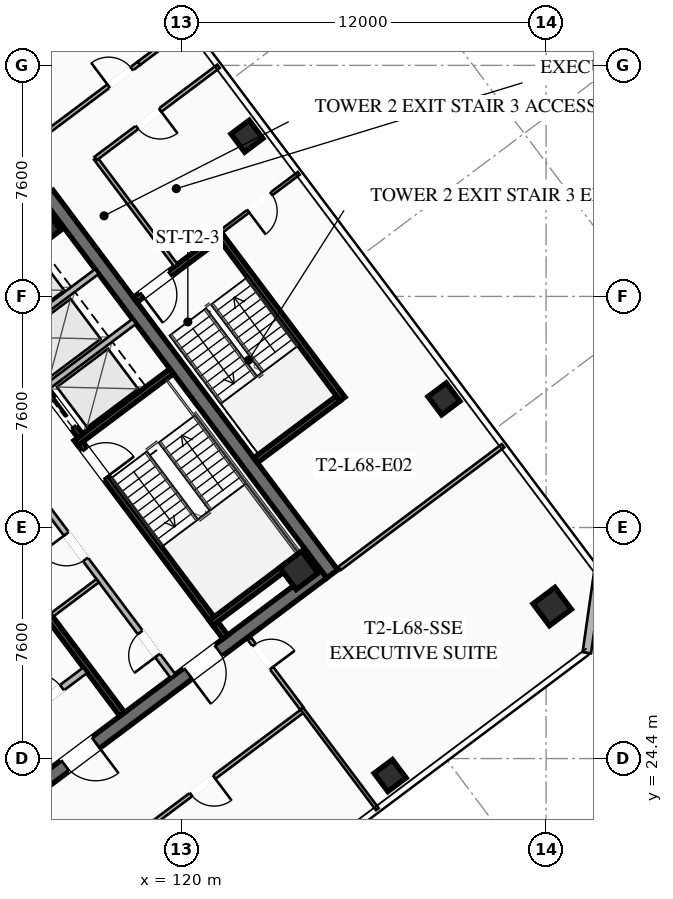
"""IFC4 building model, lengths in metres.
Left out: names, types, materials, properties, quantities, classifications, styles, units other than length and angle.
Written with IfcOpenShell. Run it as: python <this file> out.ifc"""

import sys

from ifc_helpers import new_model, si_unit, direction, frame, frame_2d, origin, origin_2d, place, context, subcontext, project, spatial, rectangle, hollow_rectangle, extrude, element, fill, save


model = new_model("IFC4")
c1 = context("Model", 3, precision=1e-05, world=origin(), true_north=direction((0.0, 1.0)))
c2 = subcontext(c1, "Body", "Model", "MODEL_VIEW")
j1 = project(units=[si_unit("LENGTHUNIT", "METRE"), si_unit("PLANEANGLEUNIT", "RADIAN")], contexts=[c1])
p1 = place(None, origin())
s1 = spatial("IfcSite", under=j1, at=p1, CompositionType="ELEMENT")
p2 = place(p1, origin())
s2 = spatial("IfcBuilding", under=s1, at=p2, CompositionType="ELEMENT")
p3 = place(p2, frame((0.0, 0.0, 251.4)))
s3 = spatial("IfcBuildingStorey", under=s2, at=p3, CompositionType="ELEMENT", Elevation=251.4)
p4 = place(p3, frame((115.604, 42.953, 0.0), z_axis=(0.0, 0.0, 1.0), x_axis=(0.600005007985, -0.799996243986, 0.0)))
e1 = element("IfcWall", 1, at=p4, inside=s3, PredefinedType="SHEAR", context=c2, shape_type="SweptSolid", body=[
    extrude(rectangle(XDim=15.6, YDim=0.45, at=frame_2d((7.8, 0.0))), origin(), (0.0, 0.0, 1.0), 4.0),
])
p5 = place(p3, frame((124.649, 30.518, 0.0), z_axis=(0.0, 0.0, 1.0), x_axis=(-0.8, -0.6, 0.0)))
e2 = element("IfcWall", 2, at=p5, inside=s3, PredefinedType="SHEAR", context=c2, shape_type="SweptSolid", body=[
    extrude(rectangle(XDim=15.26, YDim=0.45, at=frame_2d((7.63, 0.0))), origin(), (0.0, 0.0, 1.0), 4.0),
])
p6 = place(p5, frame((9.33, 0.0, 0.0)))
e3 = element("IfcOpeningElement", 3, at=p6, cuts=e2, PredefinedType="OPENING", context=c2, shape_type="SweptSolid", body=[
    extrude(rectangle(XDim=1.25, YDim=2.25, at=frame_2d((0.625, 1.125))), frame((0.0, 0.235, 0.0), z_axis=(0.0, -1.0, 0.0), x_axis=(1.0, 0.0, 0.0)), (0.0, 0.0, 1.0), 0.47),
])
p7 = place(p5, frame((4.28, 0.0, 0.0)))
e4 = element("IfcOpeningElement", 4, at=p7, cuts=e2, PredefinedType="OPENING", context=c2, shape_type="SweptSolid", body=[
    extrude(rectangle(XDim=1.25, YDim=2.25, at=frame_2d((0.625, 1.125))), frame((0.0, 0.235, 0.0), z_axis=(0.0, -1.0, 0.0), x_axis=(1.0, 0.0, 0.0)), (0.0, 0.0, 1.0), 0.47),
])
for number, where, z_axis, x_axis in (
    (5, (123.87, 30.59, 0.0), (0.0, 0.0, 1.0), (0.8, 0.6, 0.0)),
    (6, (115.41, 41.87, 0.0), (0.0, 0.0, 1.0), (0.8, 0.6, 0.0)),
    (7, (132.2, 29.4, 0.0), (0.0, 0.0, 1.0), (0.8, 0.6, 0.0)),
):
    element("IfcColumn", number, at=place(p3, frame(where, z_axis=z_axis, x_axis=x_axis)), inside=s3, PredefinedType="COLUMN", context=c2, shape_type="SweptSolid", body=[
        extrude(hollow_rectangle(XDim=0.9, YDim=0.9, WallThickness=0.04, at=origin_2d()), origin(), (0.0, 0.0, 1.0), 3.78),
    ])
for number, where, z_axis, x_axis in (
    (8, (126.87, 23.84, 0.0), (0.0, 0.0, 1.0), (0.8, 0.6, 0.0)),
    (9, (128.64, 36.23, 0.0), (0.0, 0.0, 1.0), (0.8, 0.6, 0.0)),
    (10, (122.16, 44.87, 0.0), (0.0, 0.0, 1.0), (0.8, 0.6, 0.0)),
):
    element("IfcColumn", number, at=place(p3, frame(where, z_axis=z_axis, x_axis=x_axis)), inside=s3, PredefinedType="COLUMN", context=c2, shape_type="SweptSolid", body=[
        extrude(hollow_rectangle(XDim=0.75, YDim=0.75, WallThickness=0.032, at=origin_2d()), origin(), (0.0, 0.0, 1.0), 3.78),
    ])
p8 = place(p3, frame((133.72, 30.54, 0.0), z_axis=(0.0, 0.0, 1.0), x_axis=(-0.141370477216, -0.989956760759, 0.0)))
e11 = element("IfcWall", 11, at=p8, inside=s3, PredefinedType="SOLIDWALL", context=c2, shape_type="SweptSolid", body=[
    extrude(rectangle(XDim=2.687, YDim=0.28, at=frame_2d((1.344, 0.0))), origin(), (0.0, 0.0, 1.0), 3.78),
])
p9 = place(p3, frame((116.56, 34.92, 0.0), z_axis=(0.0, 0.0, 1.0), x_axis=(0.59999041401, -0.800007189403, 0.0)))
e12 = element("IfcWall", 12, at=p9, inside=s3, PredefinedType="SHEAR", context=c2, shape_type="SweptSolid", body=[
    extrude(rectangle(XDim=8.15, YDim=0.2, at=frame_2d((4.075, 0.0))), origin(), (0.0, 0.0, 1.0), 3.78),
])
p10 = place(p9, frame((0.45, 0.0, 0.0)))
e13 = element("IfcOpeningElement", 13, at=p10, cuts=e12, PredefinedType="OPENING", context=c2, shape_type="SweptSolid", body=[
    extrude(rectangle(XDim=1.15, YDim=2.2, at=frame_2d((0.575, 1.1))), frame((0.0, 0.11, 0.0), z_axis=(0.0, -1.0, 0.0), x_axis=(1.0, 0.0, 0.0)), (0.0, 0.0, 1.0), 0.22),
])
for number, where, z_axis, x_axis in (
    (14, (116.54, 34.78, 0.0), (0.0, 0.0, 1.0), (0.8, 0.6, 0.0)),
    (15, (120.98, 28.86, 0.0), (0.0, 0.0, 1.0), (0.8, 0.6, 0.0)),
):
    element("IfcWall", number, at=place(p3, frame(where, z_axis=z_axis, x_axis=x_axis)), inside=s3, PredefinedType="SHEAR", context=c2, shape_type="SweptSolid", body=[
        extrude(rectangle(XDim=3.93, YDim=0.2, at=frame_2d((1.965, 0.0))), origin(), (0.0, 0.0, 1.0), 3.78),
    ])
p11 = place(p3, frame((118.058, 25.856, 0.0), z_axis=(0.0, 0.0, 1.0), x_axis=(-0.600002657301, 0.799998007018, 0.0)))
e16 = element("IfcWall", 16, at=p11, inside=s3, PredefinedType="SHEAR", context=c2, shape_type="SweptSolid", body=[
    extrude(rectangle(XDim=14.7, YDim=0.2, at=frame_2d((7.35, 0.0))), origin(), (0.0, 0.0, 1.0), 3.78),
])
p12 = place(p3, frame((114.316, 25.412, 0.0), z_axis=(0.0, 0.0, 1.0), x_axis=(0.800018601094, 0.59997519774, 0.0)))
e17 = element("IfcWall", 17, at=p12, inside=s3, PredefinedType="SOLIDWALL", context=c2, shape_type="SweptSolid", body=[
    extrude(rectangle(XDim=3.15, YDim=0.22, at=frame_2d((1.575, 0.0))), origin(), (0.0, 0.0, 1.0), 2.971),
])
p13 = place(p12, frame((0.95, 0.0, 0.0)))
e18 = element("IfcOpeningElement", 18, at=p13, cuts=e17, PredefinedType="OPENING", context=c2, shape_type="SweptSolid", body=[
    extrude(rectangle(XDim=1.25, YDim=2.25, at=frame_2d((0.625, 1.125))), frame((0.0, 0.12, 0.0), z_axis=(0.0, -1.0, 0.0), x_axis=(1.0, 0.0, 0.0)), (0.0, 0.0, 1.0), 0.24),
])
p14 = place(p3, frame((112.75, 40.25, 0.0), z_axis=(0.0, 0.0, 1.0), x_axis=(0.599994036198, -0.800004472816, 0.0)))
e19 = element("IfcWall", 19, at=p14, inside=s3, PredefinedType="SHEAR", context=c2, shape_type="SweptSolid", body=[
    extrude(rectangle(XDim=6.55, YDim=0.2, at=frame_2d((3.275, 0.0))), origin(), (0.0, 0.0, 1.0), 3.78),
])
p15 = place(p14, frame((5.075, 0.0, 0.0)))
e20 = element("IfcOpeningElement", 20, at=p15, cuts=e19, PredefinedType="OPENING", context=c2, shape_type="SweptSolid", body=[
    extrude(rectangle(XDim=1.1, YDim=2.2, at=frame_2d((0.55, 1.1))), frame((0.0, 0.11, 0.0), z_axis=(0.0, -1.0, 0.0), x_axis=(1.0, 0.0, 0.0)), (0.0, 0.0, 1.0), 0.22),
])
p16 = place(p14, frame((3.025, 0.0, 0.0)))
e21 = element("IfcOpeningElement", 21, at=p16, cuts=e19, PredefinedType="OPENING", context=c2, shape_type="SweptSolid", body=[
    extrude(rectangle(XDim=1.1, YDim=2.2, at=frame_2d((0.55, 1.1))), frame((0.0, 0.11, 0.0), z_axis=(0.0, -1.0, 0.0), x_axis=(1.0, 0.0, 0.0)), (0.0, 0.0, 1.0), 0.22),
])
p17 = place(p14, frame((1.025, 0.0, 0.0)))
e22 = element("IfcOpeningElement", 22, at=p17, cuts=e19, PredefinedType="OPENING", context=c2, shape_type="SweptSolid", body=[
    extrude(rectangle(XDim=1.1, YDim=2.2, at=frame_2d((0.55, 1.1))), frame((0.0, 0.11, 0.0), z_axis=(0.0, -1.0, 0.0), x_axis=(1.0, 0.0, 0.0)), (0.0, 0.0, 1.0), 0.22),
])
for number, where, z_axis, x_axis in (
    (23, (115.59, 36.63, 0.0), (0.0, 0.0, 1.0), (0.8, 0.6, 0.0)),
    (24, (114.36, 38.27, 0.0), (0.0, 0.0, 1.0), (0.8, 0.6, 0.0)),
):
    element("IfcWall", number, at=place(p3, frame(where, z_axis=z_axis, x_axis=x_axis)), inside=s3, PredefinedType="SOLIDWALL", context=c2, shape_type="SweptSolid", body=[
        extrude(rectangle(XDim=3.58, YDim=0.2, at=frame_2d((1.79, 0.0))), origin(), (0.0, 0.0, 1.0), 3.78),
    ])
p18 = place(p3, frame((119.73, 27.11, 0.0), z_axis=(0.0, 0.0, 1.0), x_axis=(-0.600005580459, 0.799995814625, 0.0)))
e25 = element("IfcWall", 25, at=p18, inside=s3, PredefinedType="SOLIDWALL", context=c2, shape_type="SweptSolid", body=[
    extrude(rectangle(XDim=7.0, YDim=0.2, at=frame_2d((3.5, 0.0))), origin(), (0.0, 0.0, 1.0), 2.971),
])
p19 = place(p18, frame((0.85, 0.0, 0.0)))
e26 = element("IfcOpeningElement", 26, at=p19, cuts=e25, PredefinedType="OPENING", context=c2, shape_type="SweptSolid", body=[
    extrude(rectangle(XDim=0.95, YDim=2.05, at=frame_2d((0.475, 1.025))), frame((0.0, 0.11, 0.0), z_axis=(0.0, -1.0, 0.0), x_axis=(1.0, 0.0, 0.0)), (0.0, 0.0, 1.0), 0.22),
])
p20 = place(p18, frame((4.8, 0.0, 0.0)))
e27 = element("IfcOpeningElement", 27, at=p20, cuts=e25, PredefinedType="OPENING", context=c2, shape_type="SweptSolid", body=[
    extrude(rectangle(XDim=1.05, YDim=2.2, at=frame_2d((0.525, 1.1))), frame((0.0, 0.11, 0.0), z_axis=(0.0, -1.0, 0.0), x_axis=(1.0, 0.0, 0.0)), (0.0, 0.0, 1.0), 0.22),
])
p21 = place(p3, frame((115.746, 29.122, 0.0), z_axis=(0.0, 0.0, 1.0), x_axis=(0.8, 0.6, 0.0)))
e28 = element("IfcWall", 28, at=p21, inside=s3, PredefinedType="PARTITIONING", context=c2, shape_type="SweptSolid", body=[
    extrude(rectangle(XDim=1.88, YDim=0.135, at=frame_2d((0.94, 0.0))), origin(), (0.0, 0.0, 1.0), 2.971),
])
p22 = place(p3, frame((125.304, 36.228, 0.0), z_axis=(0.0, 0.0, 1.0), x_axis=(-0.59998851072, 0.800008616831, 0.0)))
e29 = element("IfcWall", 29, at=p22, inside=s3, PredefinedType="SHEAR", context=c2, shape_type="SweptSolid", body=[
    extrude(rectangle(XDim=6.8, YDim=0.2, at=frame_2d((3.4, 0.0))), origin(), (0.0, 0.0, 1.0), 3.78),
])
p23 = place(p3, frame((121.204, 41.528, 0.0), z_axis=(0.0, 0.0, 1.0), x_axis=(-0.800017232136, -0.599977023131, 0.0)))
e30 = element("IfcWall", 30, at=p23, inside=s3, PredefinedType="SHEAR", context=c2, shape_type="SweptSolid", body=[
    extrude(rectangle(XDim=3.4, YDim=0.2, at=frame_2d((1.7, 0.0))), origin(), (0.0, 0.0, 1.0), 3.78),
])
p24 = place(p23, frame((1.975, 0.0, 0.0)))
e31 = element("IfcOpeningElement", 31, at=p24, cuts=e30, PredefinedType="OPENING", context=c2, shape_type="SweptSolid", body=[
    extrude(rectangle(XDim=1.15, YDim=2.2, at=frame_2d((0.575, 1.1))), frame((0.0, 0.11, 0.0), z_axis=(0.0, -1.0, 0.0), x_axis=(1.0, 0.0, 0.0)), (0.0, 0.0, 1.0), 0.22),
])
p25 = place(p3, frame((122.444, 34.208, 0.0), z_axis=(0.0, 0.0, 1.0), x_axis=(0.79999138319, 0.600011488909, 0.0)))
e32 = element("IfcWall", 32, at=p25, inside=s3, PredefinedType="SHEAR", context=c2, shape_type="SweptSolid", body=[
    extrude(rectangle(XDim=3.4, YDim=0.2, at=frame_2d((1.7, 0.0))), origin(), (0.0, 0.0, 1.0), 3.78),
])
p26 = place(p3, frame((119.824, 40.618, 0.0), z_axis=(0.0, 0.0, 1.0), x_axis=(-0.599982243973, 0.800013316712, 0.0)))
e33 = element("IfcWall", 33, at=p26, inside=s3, PredefinedType="PARTITIONING", context=c2, shape_type="SweptSolid", body=[
    extrude(rectangle(XDim=4.4, YDim=0.135, at=frame_2d((2.2, 0.0))), origin(), (0.0, 0.0, 1.0), 2.971),
])
p27 = place(p3, frame((99.746, 33.122, 0.0), z_axis=(0.0, 0.0, 1.0), x_axis=(0.800001242445, 0.599998343403, 0.0)))
e34 = element("IfcWall", 34, at=p27, inside=s3, PredefinedType="PARTITIONING", context=c2, shape_type="SweptSolid", body=[
    extrude(rectangle(XDim=23.58, YDim=0.135, at=frame_2d((11.79, 0.0))), origin(), (0.0, 0.0, 1.0), 2.971),
])
p28 = place(p27, frame((0.3, 0.0, 0.0)))
e35 = element("IfcOpeningElement", 35, at=p28, cuts=e34, PredefinedType="OPENING", context=c2, shape_type="SweptSolid", body=[
    extrude(rectangle(XDim=0.95, YDim=2.05, at=frame_2d((0.475, 1.025))), frame((0.0, 0.077, 0.0), z_axis=(0.0, -1.0, 0.0), x_axis=(1.0, 0.0, 0.0)), (0.0, 0.0, 1.0), 0.155),
])
p29 = place(p27, frame((22.33, 0.0, 0.0)))
e36 = element("IfcOpeningElement", 36, at=p29, cuts=e34, PredefinedType="OPENING", context=c2, shape_type="SweptSolid", body=[
    extrude(rectangle(XDim=0.95, YDim=2.05, at=frame_2d((0.475, 1.025))), frame((0.0, 0.077, 0.0), z_axis=(0.0, -1.0, 0.0), x_axis=(1.0, 0.0, 0.0)), (0.0, 0.0, 1.0), 0.155),
])
p30 = place(p3, frame((118.61, 47.27, 0.0), z_axis=(0.0, 0.0, 1.0), x_axis=(0.799956698502, 0.600057730991, 0.0)))
e37 = element("IfcWall", 37, at=p30, inside=s3, PredefinedType="PARTITIONING", context=c2, shape_type="SweptSolid", body=[
    extrude(rectangle(XDim=2.03, YDim=0.135, at=frame_2d((1.015, 0.0))), origin(), (0.0, 0.0, 1.0), 2.971),
])
p31 = place(p3, frame((124.012, 25.984, 0.0), z_axis=(0.0, 0.0, 1.0), x_axis=(-0.800003872688, -0.599994836382, 0.0)))
e38 = element("IfcWall", 38, at=p31, inside=s3, PredefinedType="PARTITIONING", context=c2, shape_type="SweptSolid", body=[
    extrude(rectangle(XDim=15.13, YDim=0.135, at=frame_2d((7.565, 0.0))), origin(), (0.0, 0.0, 1.0), 2.971),
])
p32 = place(p31, frame((13.8, 0.0, 0.0)))
e39 = element("IfcOpeningElement", 39, at=p32, cuts=e38, PredefinedType="OPENING", context=c2, shape_type="SweptSolid", body=[
    extrude(rectangle(XDim=0.95, YDim=2.05, at=frame_2d((0.475, 1.025))), frame((0.0, 0.077, 0.0), z_axis=(0.0, -1.0, 0.0), x_axis=(1.0, 0.0, 0.0)), (0.0, 0.0, 1.0), 0.155),
])
p33 = place(p31, frame((3.663, 0.0, 0.0)))
e40 = element("IfcOpeningElement", 40, at=p33, cuts=e38, PredefinedType="OPENING", context=c2, shape_type="SweptSolid", body=[
    extrude(rectangle(XDim=0.95, YDim=2.05, at=frame_2d((0.475, 1.025))), frame((0.0, 0.077, 0.0), z_axis=(0.0, -1.0, 0.0), x_axis=(1.0, 0.0, 0.0)), (0.0, 0.0, 1.0), 0.155),
])
p34 = place(p3, frame((122.248, 28.336, 0.0), z_axis=(0.0, 0.0, 1.0), x_axis=(0.600040975122, -0.799969267018, 0.0)))
e41 = element("IfcWall", 41, at=p34, inside=s3, PredefinedType="PARTITIONING", context=c2, shape_type="SweptSolid", body=[
    extrude(rectangle(XDim=2.86, YDim=0.135, at=frame_2d((1.43, 0.0))), origin(), (0.0, 0.0, 1.0), 2.971),
])
p35 = place(p34, frame((0.25, 0.0, 0.0)))
e42 = element("IfcOpeningElement", 42, at=p35, cuts=e41, PredefinedType="OPENING", context=c2, shape_type="SweptSolid", body=[
    extrude(rectangle(XDim=0.95, YDim=2.05, at=frame_2d((0.475, 1.025))), frame((0.0, 0.077, 0.0), z_axis=(0.0, -1.0, 0.0), x_axis=(1.0, 0.0, 0.0)), (0.0, 0.0, 1.0), 0.155),
])
p36 = place(p3, frame((126.448, 22.736, 0.0), z_axis=(0.0, 0.0, 1.0), x_axis=(-0.599981128793, 0.800014153057, 0.0)))
e43 = element("IfcWall", 43, at=p36, inside=s3, PredefinedType="PARTITIONING", context=c2, shape_type="SweptSolid", body=[
    extrude(rectangle(XDim=4.14, YDim=0.11, at=frame_2d((2.07, 0.0))), origin(), (0.0, 0.0, 1.0), 2.971),
])
p37 = place(p3, frame((121.224, 47.168, 0.0), z_axis=(0.0, 0.0, 1.0), x_axis=(-0.8, -0.6, 0.0)))
e44 = element("IfcWall", 44, at=p37, inside=s3, PredefinedType="PARTITIONING", context=c2, shape_type="SweptSolid", body=[
    extrude(rectangle(XDim=5.05, YDim=0.135, at=frame_2d((2.525, 0.0))), origin(), (0.0, 0.0, 1.0), 2.971),
])
p38 = place(p37, frame((2.4, 0.0, 0.0)))
e45 = element("IfcOpeningElement", 45, at=p38, cuts=e44, PredefinedType="OPENING", context=c2, shape_type="SweptSolid", body=[
    extrude(rectangle(XDim=0.95, YDim=2.05, at=frame_2d((0.475, 1.025))), frame((0.0, 0.077, 0.0), z_axis=(0.0, -1.0, 0.0), x_axis=(1.0, 0.0, 0.0)), (0.0, 0.0, 1.0), 0.155),
])
p39 = place(p3, frame((125.208, 30.656, 0.0), z_axis=(0.0, 0.0, 1.0), x_axis=(0.8, 0.6, 0.0)))
e46 = element("IfcWall", 46, at=p39, inside=s3, PredefinedType="PARTITIONING", context=c2, shape_type="SweptSolid", body=[
    extrude(rectangle(XDim=6.72, YDim=0.135, at=frame_2d((3.36, 0.0))), origin(), (0.0, 0.0, 1.0), 2.971),
])
p40 = place(p3, frame((123.864, 43.648, 0.0), z_axis=(0.0, 0.0, 1.0), x_axis=(-0.800018310174, -0.599975585658, 0.0)))
e47 = element("IfcWall", 47, at=p40, inside=s3, PredefinedType="PARTITIONING", context=c2, shape_type="SweptSolid", body=[
    extrude(rectangle(XDim=3.2, YDim=0.11, at=frame_2d((1.6, 0.0))), origin(), (0.0, 0.0, 1.0), 2.971),
])
p41 = place(p40, frame((1.125, 0.0, 0.0)))
e48 = element("IfcOpeningElement", 48, at=p41, cuts=e47, PredefinedType="OPENING", context=c2, shape_type="SweptSolid", body=[
    extrude(rectangle(XDim=0.95, YDim=2.05, at=frame_2d((0.475, 1.025))), frame((0.0, 0.065, 0.0), z_axis=(0.0, -1.0, 0.0), x_axis=(1.0, 0.0, 0.0)), (0.0, 0.0, 1.0), 0.13),
])
p42 = place(p6, origin())
e49 = element("IfcDoor", 49, at=p42, inside=s3, OperationType="SINGLE_SWING_LEFT", PredefinedType="DOOR", context=c2, shape_type="SweptSolid", body=[
    extrude(rectangle(XDim=1.25, YDim=2.25, at=frame_2d((0.625, 1.125))), frame((0.0, 0.025, 0.0), z_axis=(0.0, -1.0, 0.0), x_axis=(1.0, 0.0, 0.0)), (0.0, 0.0, 1.0), 0.05),
])
fill(e3, e49)
p43 = place(p7, origin())
e50 = element("IfcDoor", 50, at=p43, inside=s3, OperationType="SINGLE_SWING_RIGHT", PredefinedType="DOOR", context=c2, shape_type="SweptSolid", body=[
    extrude(rectangle(XDim=1.25, YDim=2.25, at=frame_2d((0.625, 1.125))), frame((0.0, 0.025, 0.0), z_axis=(0.0, -1.0, 0.0), x_axis=(1.0, 0.0, 0.0)), (0.0, 0.0, 1.0), 0.05),
])
fill(e4, e50)
p44 = place(p10, origin())
e51 = element("IfcDoor", 51, at=p44, inside=s3, OperationType="SINGLE_SWING_RIGHT", PredefinedType="DOOR", context=c2, shape_type="SweptSolid", body=[
    extrude(rectangle(XDim=1.15, YDim=2.2, at=frame_2d((0.575, 1.1))), frame((0.0, 0.025, 0.0), z_axis=(0.0, -1.0, 0.0), x_axis=(1.0, 0.0, 0.0)), (0.0, 0.0, 1.0), 0.05),
])
fill(e13, e51)
p45 = place(p13, origin())
e52 = element("IfcDoor", 52, at=p45, inside=s3, OperationType="SINGLE_SWING_LEFT", PredefinedType="DOOR", context=c2, shape_type="SweptSolid", body=[
    extrude(rectangle(XDim=1.25, YDim=2.25, at=frame_2d((0.625, 1.125))), frame((0.0, 0.025, 0.0), z_axis=(0.0, -1.0, 0.0), x_axis=(1.0, 0.0, 0.0)), (0.0, 0.0, 1.0), 0.05),
])
fill(e18, e52)
p46 = place(p19, origin())
e53 = element("IfcDoor", 53, at=p46, inside=s3, OperationType="SINGLE_SWING_LEFT", PredefinedType="DOOR", context=c2, shape_type="SweptSolid", body=[
    extrude(rectangle(XDim=0.95, YDim=2.05, at=frame_2d((0.475, 1.025))), frame((0.0, 0.025, 0.0), z_axis=(0.0, -1.0, 0.0), x_axis=(1.0, 0.0, 0.0)), (0.0, 0.0, 1.0), 0.05),
])
fill(e26, e53)
p47 = place(p20, origin())
e54 = element("IfcDoor", 54, at=p47, inside=s3, OperationType="SINGLE_SWING_RIGHT", PredefinedType="DOOR", context=c2, shape_type="SweptSolid", body=[
    extrude(rectangle(XDim=1.05, YDim=2.2, at=frame_2d((0.525, 1.1))), frame((0.0, 0.025, 0.0), z_axis=(0.0, -1.0, 0.0), x_axis=(1.0, 0.0, 0.0)), (0.0, 0.0, 1.0), 0.05),
])
fill(e27, e54)
p48 = place(p24, origin())
e55 = element("IfcDoor", 55, at=p48, inside=s3, OperationType="SINGLE_SWING_RIGHT", PredefinedType="DOOR", context=c2, shape_type="SweptSolid", body=[
    extrude(rectangle(XDim=1.15, YDim=2.2, at=frame_2d((0.575, 1.1))), frame((0.0, 0.025, 0.0), z_axis=(0.0, -1.0, 0.0), x_axis=(1.0, 0.0, 0.0)), (0.0, 0.0, 1.0), 0.05),
])
fill(e31, e55)
p49 = place(p29, origin())
e56 = element("IfcDoor", 56, at=p49, inside=s3, OperationType="SINGLE_SWING_LEFT", PredefinedType="DOOR", context=c2, shape_type="SweptSolid", body=[
    extrude(rectangle(XDim=0.95, YDim=2.05, at=frame_2d((0.475, 1.025))), frame((0.0, 0.025, 0.0), z_axis=(0.0, -1.0, 0.0), x_axis=(1.0, 0.0, 0.0)), (0.0, 0.0, 1.0), 0.05),
])
fill(e36, e56)
p50 = place(p33, origin())
e57 = element("IfcDoor", 57, at=p50, inside=s3, OperationType="SINGLE_SWING_LEFT", PredefinedType="DOOR", context=c2, shape_type="SweptSolid", body=[
    extrude(rectangle(XDim=0.95, YDim=2.05, at=frame_2d((0.475, 1.025))), frame((0.0, 0.025, 0.0), z_axis=(0.0, -1.0, 0.0), x_axis=(1.0, 0.0, 0.0)), (0.0, 0.0, 1.0), 0.05),
])
fill(e40, e57)
p51 = place(p35, origin())
e58 = element("IfcDoor", 58, at=p51, inside=s3, OperationType="SINGLE_SWING_RIGHT", PredefinedType="DOOR", context=c2, shape_type="SweptSolid", body=[
    extrude(rectangle(XDim=0.95, YDim=2.05, at=frame_2d((0.475, 1.025))), frame((0.0, 0.025, 0.0), z_axis=(0.0, -1.0, 0.0), x_axis=(1.0, 0.0, 0.0)), (0.0, 0.0, 1.0), 0.05),
])
fill(e42, e58)
p52 = place(p38, origin())
e59 = element("IfcDoor", 59, at=p52, inside=s3, OperationType="SINGLE_SWING_LEFT", PredefinedType="DOOR", context=c2, shape_type="SweptSolid", body=[
    extrude(rectangle(XDim=0.95, YDim=2.05, at=frame_2d((0.475, 1.025))), frame((0.0, 0.025, 0.0), z_axis=(0.0, -1.0, 0.0), x_axis=(1.0, 0.0, 0.0)), (0.0, 0.0, 1.0), 0.05),
])
fill(e45, e59)
p53 = place(p41, origin())
e60 = element("IfcDoor", 60, at=p53, inside=s3, OperationType="SINGLE_SWING_RIGHT", PredefinedType="DOOR", context=c2, shape_type="SweptSolid", body=[
    extrude(rectangle(XDim=0.95, YDim=2.05, at=frame_2d((0.475, 1.025))), frame((0.0, 0.025, 0.0), z_axis=(0.0, -1.0, 0.0), x_axis=(1.0, 0.0, 0.0)), (0.0, 0.0, 1.0), 0.05),
])
fill(e48, e60)
p54 = place(p15, origin())
e61 = element("IfcDoor", 61, at=p54, inside=s3, OperationType="SLIDING_TO_LEFT", PredefinedType="DOOR", context=c2, shape_type="SweptSolid", body=[
    extrude(rectangle(XDim=1.1, YDim=2.2, at=frame_2d((0.55, 1.1))), frame((0.0, 0.025, 0.0), z_axis=(0.0, -1.0, 0.0), x_axis=(1.0, 0.0, 0.0)), (0.0, 0.0, 1.0), 0.05),
])
fill(e20, e61)
save(model, sys.argv[1])
